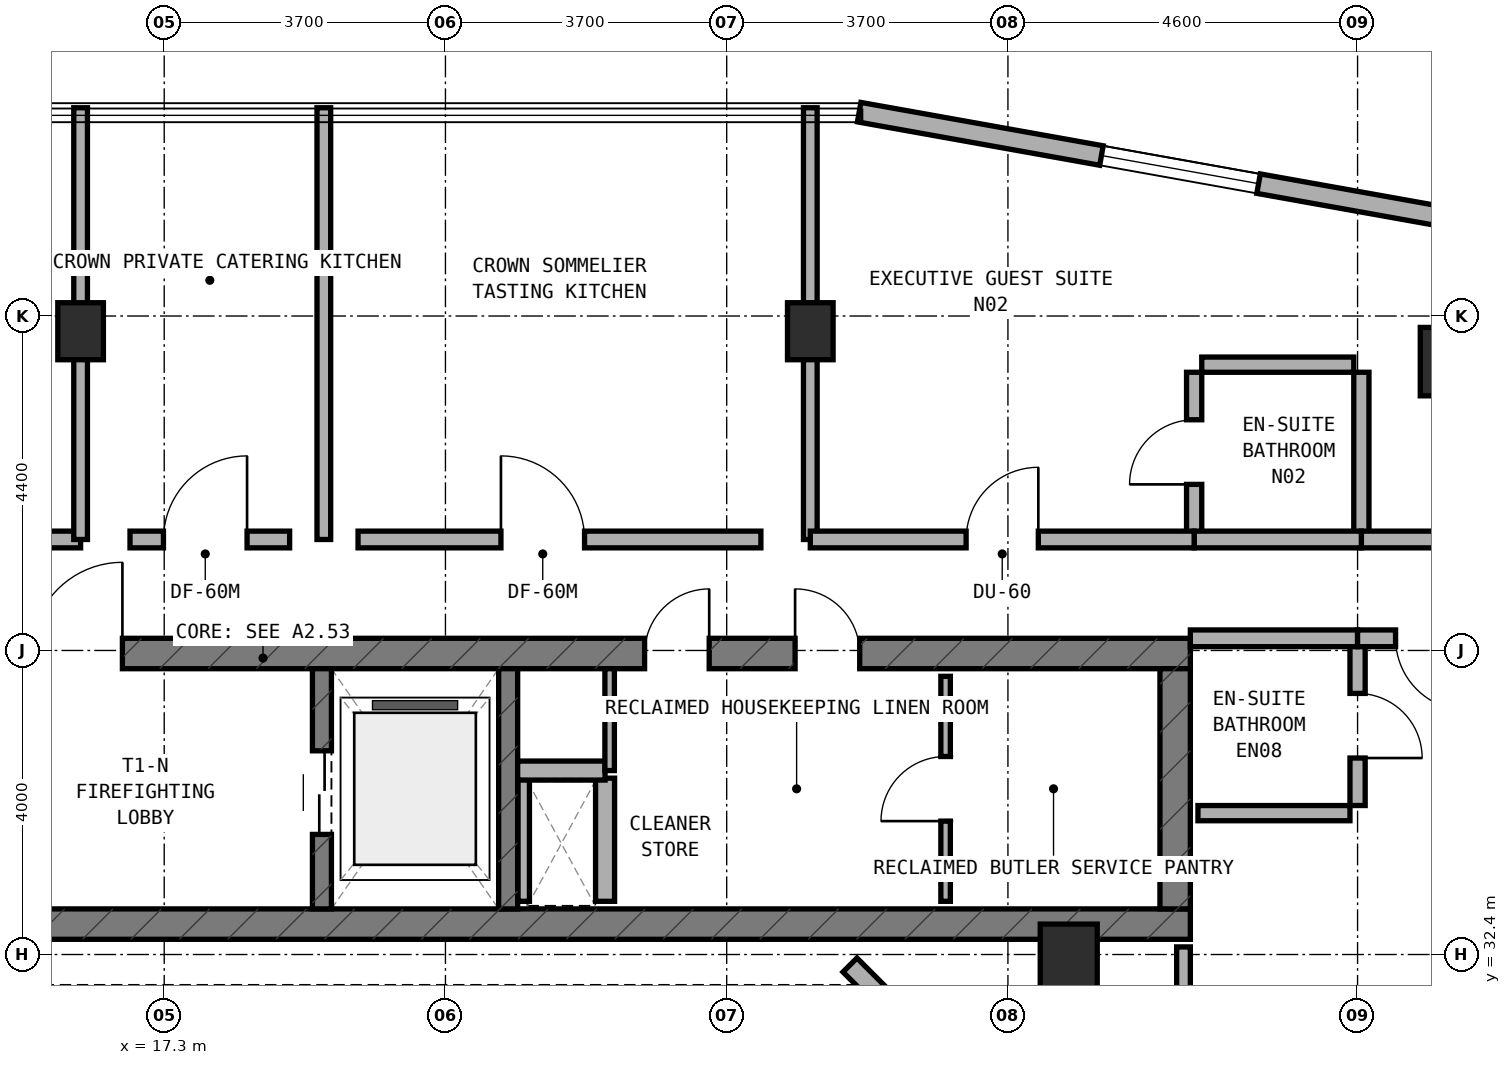
"""IFC4 building model, lengths in metres.
Left out: names, types, materials, properties, quantities, classifications, styles, units other than length and angle.
Written with IfcOpenShell. Run it as: python <this file> out.ifc"""

import sys

from ifc_helpers import new_model, si_unit, direction, frame, frame_2d, origin, origin_2d, place, context, subcontext, project, spatial, rectangle, extrude, element, fill, save


model = new_model("IFC4")
c1 = context("Model", 3, precision=1e-05, world=origin(), true_north=direction((0.0, 1.0)))
c2 = subcontext(c1, "Body", "Model", "MODEL_VIEW")
j1 = project(units=[si_unit("LENGTHUNIT", "METRE"), si_unit("PLANEANGLEUNIT", "RADIAN")], contexts=[c1])
p1 = place(None, origin())
s1 = spatial("IfcSite", under=j1, at=p1, CompositionType="ELEMENT")
p2 = place(p1, origin())
s2 = spatial("IfcBuilding", under=s1, at=p2, CompositionType="ELEMENT")
p3 = place(p2, frame((0.0, 0.0, 246.8)))
s3 = spatial("IfcBuildingStorey", under=s2, at=p3, CompositionType="ELEMENT", Elevation=246.8)
p4 = place(p3, frame((6.4, 32.8, 0.0), z_axis=(0.0, 0.0, 1.0), x_axis=(1.0, 0.0, 0.0)))
e1 = element("IfcWall", 1, at=p4, inside=s3, PredefinedType="SHEAR", context=c2, shape_type="SweptSolid", body=[
    extrude(rectangle(XDim=24.4, YDim=0.4, at=frame_2d((12.2, 0.0))), origin(), (0.0, 0.0, 1.0), 3.6),
])
p5 = place(p4, frame((6.05, 0.0, 0.0)))
e2 = element("IfcOpeningElement", 2, at=p5, cuts=e1, PredefinedType="OPENING", context=c2, shape_type="SweptSolid", body=[
    extrude(rectangle(XDim=1.1, YDim=2.15, at=frame_2d((0.55, 1.075))), frame((0.0, 0.21, 0.0), z_axis=(0.0, -1.0, 0.0), x_axis=(1.0, 0.0, 0.0)), (0.0, 0.0, 1.0), 0.42),
])
p6 = place(p3, frame((6.4, 36.36, 0.0), z_axis=(0.0, 0.0, 1.0), x_axis=(1.0, 0.0, 0.0)))
e3 = element("IfcWall", 3, at=p6, inside=s3, PredefinedType="SHEAR", context=c2, shape_type="SweptSolid", body=[
    extrude(rectangle(XDim=24.4, YDim=0.4, at=frame_2d((12.2, 0.0))), origin(), (0.0, 0.0, 1.0), 3.6),
])
p7 = place(p6, frame((9.15, 0.0, 0.0)))
e4 = element("IfcOpeningElement", 4, at=p7, cuts=e3, PredefinedType="OPENING", context=c2, shape_type="SweptSolid", body=[
    extrude(rectangle(XDim=1.2, YDim=2.15, at=frame_2d((0.6, 1.075))), frame((0.0, 0.21, 0.0), z_axis=(0.0, -1.0, 0.0), x_axis=(1.0, 0.0, 0.0)), (0.0, 0.0, 1.0), 0.42),
])
p8 = place(p6, frame((19.2, 0.0, 0.0)))
e5 = element("IfcOpeningElement", 5, at=p8, cuts=e3, PredefinedType="OPENING", context=c2, shape_type="SweptSolid", body=[
    extrude(rectangle(XDim=0.85, YDim=2.1, at=frame_2d((0.425, 1.05))), frame((0.0, 0.21, 0.0), z_axis=(0.0, -1.0, 0.0), x_axis=(1.0, 0.0, 0.0)), (0.0, 0.0, 1.0), 0.42),
])
p9 = place(p6, frame((17.22, 0.0, 0.0)))
e6 = element("IfcOpeningElement", 6, at=p9, cuts=e3, PredefinedType="OPENING", context=c2, shape_type="SweptSolid", body=[
    extrude(rectangle(XDim=0.85, YDim=2.1, at=frame_2d((0.425, 1.05))), frame((0.0, 0.21, 0.0), z_axis=(0.0, -1.0, 0.0), x_axis=(1.0, 0.0, 0.0)), (0.0, 0.0, 1.0), 0.42),
])
p10 = place(p3, frame((30.6, 33.0, 0.0), z_axis=(0.0, 0.0, 1.0), x_axis=(0.0, 1.0, 0.0)))
e7 = element("IfcWall", 7, at=p10, inside=s3, PredefinedType="SHEAR", context=c2, shape_type="SweptSolid", body=[
    extrude(rectangle(XDim=3.16, YDim=0.4, at=frame_2d((1.58, 0.0))), origin(), (0.0, 0.0, 1.0), 3.6),
])
p11 = place(p3, frame((19.375, 33.0, 0.0), z_axis=(0.0, 0.0, 1.0), x_axis=(0.0, 1.0, 0.0)))
e8 = element("IfcWall", 8, at=p11, inside=s3, PredefinedType="STANDARD", context=c2, shape_type="SweptSolid", body=[
    extrude(rectangle(XDim=3.16, YDim=0.25, at=frame_2d((1.58, 0.0))), origin(), (0.0, 0.0, 1.0), 3.32),
])
p12 = place(p11, frame((0.98, 0.0, 0.0)))
e9 = element("IfcOpeningElement", 9, at=p12, cuts=e8, PredefinedType="OPENING", context=c2, shape_type="SweptSolid", body=[
    extrude(rectangle(XDim=1.1, YDim=2.15, at=frame_2d((0.55, 1.075))), frame((0.0, 0.135, 0.0), z_axis=(0.0, -1.0, 0.0), x_axis=(1.0, 0.0, 0.0)), (0.0, 0.0, 1.0), 0.27),
])
p13 = place(p3, frame((21.825, 33.0, 0.0), z_axis=(0.0, 0.0, 1.0), x_axis=(0.0, 1.0, 0.0)))
e10 = element("IfcWall", 10, at=p13, inside=s3, PredefinedType="STANDARD", context=c2, shape_type="SweptSolid", body=[
    extrude(rectangle(XDim=3.16, YDim=0.25, at=frame_2d((1.58, 0.0))), origin(), (0.0, 0.0, 1.0), 3.32),
])
for number, where, z_axis, x_axis in (
    (11, (16.2, 40.6, 0.0), (0.0, 0.0, 1.0), (1.0, 0.0, 0.0)),
    (12, (25.8, 40.6, 0.0), (0.0, 0.0, 1.0), (1.0, 0.0, 0.0)),
):
    element("IfcColumn", number, at=place(p3, frame(where, z_axis=z_axis, x_axis=x_axis)), inside=s3, PredefinedType="COLUMN", context=c2, shape_type="SweptSolid", body=[
        extrude(rectangle(XDim=0.6, YDim=0.75, at=origin_2d()), origin(), (0.0, 0.0, 1.0), 3.6),
    ])
for number, where, z_axis, x_axis in (
    (13, (34.2, 40.2, 0.0), (0.0, 0.0, 1.0), (1.0, 0.0, 0.0)),
    (14, (29.2, 32.35, 0.0), (0.0, 0.0, 1.0), (1.0, 0.0, 0.0)),
):
    element("IfcColumn", number, at=place(p3, frame(where, z_axis=z_axis, x_axis=x_axis)), inside=s3, PredefinedType="COLUMN", context=c2, shape_type="SweptSolid", body=[
        extrude(rectangle(XDim=0.75, YDim=0.9, at=origin_2d()), origin(), (0.0, 0.0, 1.0), 3.6),
    ])
p14 = place(p3, frame((34.885, 41.971, 0.0), z_axis=(0.0, 0.0, 1.0), x_axis=(-0.98435676639, 0.176186709098, 0.0)))
e15 = element("IfcWall", 15, at=p14, inside=s3, PredefinedType="STANDARD", context=c2, shape_type="SweptSolid", body=[
    extrude(rectangle(XDim=8.576, YDim=0.26, at=frame_2d((4.288, 0.0))), origin(), (0.0, 0.0, 1.0), 3.32),
])
p15 = place(p14, frame((3.238, 0.0, 0.85)))
e16 = element("IfcOpeningElement", 16, at=p15, cuts=e15, PredefinedType="OPENING", context=c2, shape_type="SweptSolid", body=[
    extrude(rectangle(XDim=2.1, YDim=1.5, at=frame_2d((1.05, 0.75))), frame((0.0, 0.14, 0.0), z_axis=(0.0, -1.0, 0.0), x_axis=(1.0, 0.0, 0.0)), (0.0, 0.0, 1.0), 0.28),
])
p16 = place(p3, frame((28.156, 30.428, 0.0), z_axis=(0.0, 0.0, 1.0), x_axis=(-0.707106781187, 0.707106781187, 0.0)))
e17 = element("IfcWall", 17, at=p16, inside=s3, PredefinedType="STANDARD", context=c2, shape_type="SweptSolid", body=[
    extrude(rectangle(XDim=2.594, YDim=0.26, at=frame_2d((1.297, 0.0))), origin(), (0.0, 0.0, 1.0), 3.32),
])
p17 = place(p3, frame((27.58, 33.1, 0.0), z_axis=(0.0, 0.0, 1.0), x_axis=(0.0, 1.0, 0.0)))
e18 = element("IfcWall", 18, at=p17, inside=s3, PredefinedType="PARTITIONING", context=c2, shape_type="SweptSolid", body=[
    extrude(rectangle(XDim=2.96, YDim=0.125, at=frame_2d((1.48, 0.0))), origin(), (0.0, 0.0, 1.0), 3.32),
])
p18 = place(p17, frame((1.055, 0.0, 0.0)))
e19 = element("IfcOpeningElement", 19, at=p18, cuts=e18, PredefinedType="OPENING", context=c2, shape_type="SweptSolid", body=[
    extrude(rectangle(XDim=0.85, YDim=2.1, at=frame_2d((0.425, 1.05))), frame((0.0, 0.073, 0.0), z_axis=(0.0, -1.0, 0.0), x_axis=(1.0, 0.0, 0.0)), (0.0, 0.0, 1.0), 0.145),
])
p19 = place(p3, frame((22.03, 33.1, 0.0), z_axis=(0.0, 0.0, 1.0), x_axis=(0.0, 1.0, 0.0)))
e20 = element("IfcWall", 20, at=p19, inside=s3, PredefinedType="PARTITIONING", context=c2, shape_type="SweptSolid", body=[
    extrude(rectangle(XDim=1.62, YDim=0.15, at=frame_2d((0.81, 0.0))), origin(), (0.0, 0.0, 1.0), 3.32),
])
p20 = place(p3, frame((23.1, 33.1, 0.0), z_axis=(0.0, 0.0, 1.0), x_axis=(0.0, 1.0, 0.0)))
e21 = element("IfcWall", 21, at=p20, inside=s3, PredefinedType="SOLIDWALL", context=c2, shape_type="SweptSolid", body=[
    extrude(rectangle(XDim=1.62, YDim=0.25, at=frame_2d((0.81, 0.0))), origin(), (0.0, 0.0, 1.0), 3.32),
])
p21 = place(p3, frame((21.95, 34.82, 0.0), z_axis=(0.0, 0.0, 1.0), x_axis=(1.0, 0.0, 0.0)))
e22 = element("IfcWall", 22, at=p21, inside=s3, PredefinedType="SOLIDWALL", context=c2, shape_type="SweptSolid", body=[
    extrude(rectangle(XDim=1.15, YDim=0.25, at=frame_2d((0.575, 0.0))), origin(), (0.0, 0.0, 1.0), 3.32),
])
p22 = place(p3, frame((23.16, 34.82, 0.0), z_axis=(0.0, 0.0, 1.0), x_axis=(0.0, 1.0, 0.0)))
e23 = element("IfcWall", 23, at=p22, inside=s3, PredefinedType="PARTITIONING", context=c2, shape_type="SweptSolid", body=[
    extrude(rectangle(XDim=1.34, YDim=0.125, at=frame_2d((0.67, 0.0))), origin(), (0.0, 0.0, 1.0), 3.32),
])
p23 = place(p3, frame((11.15, 37.86, 0.0), z_axis=(0.0, 0.0, 1.0), x_axis=(1.0, 0.0, 0.0)))
e24 = element("IfcWall", 24, at=p23, inside=s3, PredefinedType="SOLIDWALL", context=c2, shape_type="SweptSolid", body=[
    extrude(rectangle(XDim=5.05, YDim=0.22, at=frame_2d((2.525, 0.0))), origin(), (0.0, 0.0, 1.0), 2.745),
])
p24 = place(p23, frame((2.05, 0.0, 0.0)))
e25 = element("IfcOpeningElement", 25, at=p24, cuts=e24, PredefinedType="OPENING", context=c2, shape_type="SweptSolid", body=[
    extrude(rectangle(XDim=0.95, YDim=2.1, at=frame_2d((0.475, 1.05))), frame((0.0, 0.12, 0.0), z_axis=(0.0, -1.0, 0.0), x_axis=(1.0, 0.0, 0.0)), (0.0, 0.0, 1.0), 0.24),
])
p25 = place(p3, frame((16.2, 37.86, 0.0), z_axis=(0.0, 0.0, 1.0), x_axis=(0.0, 1.0, 0.0)))
e26 = element("IfcWall", 26, at=p25, inside=s3, PredefinedType="SOLIDWALL", context=c2, shape_type="SweptSolid", body=[
    extrude(rectangle(XDim=5.68, YDim=0.18, at=frame_2d((2.84, 0.0))), origin(), (0.0, 0.0, 1.0), 2.745),
])
p26 = place(p3, frame((19.4, 37.86, 0.0), z_axis=(0.0, 0.0, 1.0), x_axis=(0.0, 1.0, 0.0)))
e27 = element("IfcWall", 27, at=p26, inside=s3, PredefinedType="SOLIDWALL", context=c2, shape_type="SweptSolid", body=[
    extrude(rectangle(XDim=5.68, YDim=0.18, at=frame_2d((2.84, 0.0))), origin(), (0.0, 0.0, 1.0), 3.015),
])
p27 = place(p3, frame((16.85, 37.86, 0.0), z_axis=(0.0, 0.0, 1.0), x_axis=(1.0, 0.0, 0.0)))
e28 = element("IfcWall", 28, at=p27, inside=s3, PredefinedType="SOLIDWALL", context=c2, shape_type="SweptSolid", body=[
    extrude(rectangle(XDim=2.1, YDim=0.22, at=frame_2d((1.05, 0.0))), origin(), (0.0, 0.0, 1.0), 3.32),
])
p28 = place(p27, frame((0.44, 0.0, 0.0)))
e29 = element("IfcOpeningElement", 29, at=p28, cuts=e28, PredefinedType="OPENING", context=c2, shape_type="SweptSolid", body=[
    extrude(rectangle(XDim=1.1, YDim=2.1, at=frame_2d((0.55, 1.05))), frame((0.0, 0.12, 0.0), z_axis=(0.0, -1.0, 0.0), x_axis=(1.0, 0.0, 0.0)), (0.0, 0.0, 1.0), 0.24),
])
p29 = place(p3, frame((19.85, 37.86, 0.0), z_axis=(0.0, 0.0, 1.0), x_axis=(1.0, 0.0, 0.0)))
e30 = element("IfcWall", 30, at=p29, inside=s3, PredefinedType="SOLIDWALL", context=c2, shape_type="SweptSolid", body=[
    extrude(rectangle(XDim=5.3, YDim=0.22, at=frame_2d((2.65, 0.0))), origin(), (0.0, 0.0, 1.0), 3.32),
])
p30 = place(p29, frame((1.88, 0.0, 0.0)))
e31 = element("IfcOpeningElement", 31, at=p30, cuts=e30, PredefinedType="OPENING", context=c2, shape_type="SweptSolid", body=[
    extrude(rectangle(XDim=1.1, YDim=2.1, at=frame_2d((0.55, 1.05))), frame((0.0, 0.12, 0.0), z_axis=(0.0, -1.0, 0.0), x_axis=(1.0, 0.0, 0.0)), (0.0, 0.0, 1.0), 0.24),
])
p31 = place(p3, frame((25.8, 37.86, 0.0), z_axis=(0.0, 0.0, 1.0), x_axis=(0.0, 1.0, 0.0)))
e32 = element("IfcWall", 32, at=p31, inside=s3, PredefinedType="SOLIDWALL", context=c2, shape_type="SweptSolid", body=[
    extrude(rectangle(XDim=5.68, YDim=0.18, at=frame_2d((2.84, 0.0))), origin(), (0.0, 0.0, 1.0), 2.745),
])
p32 = place(p3, frame((30.85, 37.96, 0.0), z_axis=(0.0, 0.0, 1.0), x_axis=(0.0, 1.0, 0.0)))
e33 = element("IfcWall", 33, at=p32, inside=s3, PredefinedType="PLUMBINGWALL", context=c2, shape_type="SweptSolid", body=[
    extrude(rectangle(XDim=2.1, YDim=0.2, at=frame_2d((1.05, 0.0))), origin(), (0.0, 0.0, 1.0), 3.025),
])
p33 = place(p32, frame((0.625, 0.0, 0.0)))
e34 = element("IfcOpeningElement", 34, at=p33, cuts=e33, PredefinedType="OPENING", context=c2, shape_type="SweptSolid", body=[
    extrude(rectangle(XDim=0.85, YDim=2.1, at=frame_2d((0.425, 1.05))), frame((0.0, 0.11, 0.0), z_axis=(0.0, -1.0, 0.0), x_axis=(1.0, 0.0, 0.0)), (0.0, 0.0, 1.0), 0.22),
])
p34 = place(p3, frame((30.95, 40.16, 0.0), z_axis=(0.0, 0.0, 1.0), x_axis=(1.0, 0.0, 0.0)))
e35 = element("IfcWall", 35, at=p34, inside=s3, PredefinedType="PLUMBINGWALL", context=c2, shape_type="SweptSolid", body=[
    extrude(rectangle(XDim=2.0, YDim=0.2, at=frame_2d((1.0, 0.0))), origin(), (0.0, 0.0, 1.0), 3.015),
])
p35 = place(p3, frame((33.05, 37.96, 0.0), z_axis=(0.0, 0.0, 1.0), x_axis=(0.0, 1.0, 0.0)))
e36 = element("IfcWall", 36, at=p35, inside=s3, PredefinedType="PLUMBINGWALL", context=c2, shape_type="SweptSolid", body=[
    extrude(rectangle(XDim=2.1, YDim=0.2, at=frame_2d((1.05, 0.0))), origin(), (0.0, 0.0, 1.0), 3.025),
])
p36 = place(p3, frame((33.05, 37.86, 0.0), z_axis=(0.0, 0.0, 1.0), x_axis=(1.0, 0.0, 0.0)))
e37 = element("IfcWall", 37, at=p36, inside=s3, PredefinedType="SOLIDWALL", context=c2, shape_type="SweptSolid", body=[
    extrude(rectangle(XDim=6.19, YDim=0.22, at=frame_2d((3.095, 0.0))), origin(), (0.0, 0.0, 1.0), 2.745),
])
p37 = place(p3, frame((30.85, 37.86, 0.0), z_axis=(0.0, 0.0, 1.0), x_axis=(1.0, 0.0, 0.0)))
e38 = element("IfcWall", 38, at=p37, inside=s3, PredefinedType="SOLIDWALL", context=c2, shape_type="SweptSolid", body=[
    extrude(rectangle(XDim=2.2, YDim=0.22, at=frame_2d((1.1, 0.0))), origin(), (0.0, 0.0, 1.0), 3.32),
])
p38 = place(p3, frame((25.8, 37.86, 0.0), z_axis=(0.0, 0.0, 1.0), x_axis=(1.0, 0.0, 0.0)))
e39 = element("IfcWall", 39, at=p38, inside=s3, PredefinedType="SOLIDWALL", context=c2, shape_type="SweptSolid", body=[
    extrude(rectangle(XDim=5.05, YDim=0.22, at=frame_2d((2.525, 0.0))), origin(), (0.0, 0.0, 1.0), 2.745),
])
p39 = place(p38, frame((2.05, 0.0, 0.0)))
e40 = element("IfcOpeningElement", 40, at=p39, cuts=e39, PredefinedType="OPENING", context=c2, shape_type="SweptSolid", body=[
    extrude(rectangle(XDim=0.95, YDim=2.1, at=frame_2d((0.475, 1.05))), frame((0.0, 0.12, 0.0), z_axis=(0.0, -1.0, 0.0), x_axis=(1.0, 0.0, 0.0)), (0.0, 0.0, 1.0), 0.24),
])
p40 = place(p3, frame((30.71, 17.5, 0.0), z_axis=(0.0, 0.0, 1.0), x_axis=(0.0, 1.0, 0.0)))
e41 = element("IfcWall", 41, at=p40, inside=s3, PredefinedType="SOLIDWALL", context=c2, shape_type="SweptSolid", body=[
    extrude(rectangle(XDim=15.0, YDim=0.18, at=frame_2d((7.5, 0.0))), origin(), (0.0, 0.0, 1.0), 2.745),
])
p41 = place(p3, frame((33.0, 34.36, 0.0), z_axis=(0.0, 0.0, 1.0), x_axis=(0.0, 1.0, 0.0)))
e42 = element("IfcWall", 42, at=p41, inside=s3, PredefinedType="PLUMBINGWALL", context=c2, shape_type="SweptSolid", body=[
    extrude(rectangle(XDim=2.1, YDim=0.2, at=frame_2d((1.05, 0.0))), origin(), (0.0, 0.0, 1.0), 3.32),
])
p42 = place(p41, frame((0.625, 0.0, 0.0)))
e43 = element("IfcOpeningElement", 43, at=p42, cuts=e42, PredefinedType="OPENING", context=c2, shape_type="SweptSolid", body=[
    extrude(rectangle(XDim=0.85, YDim=2.1, at=frame_2d((0.425, 1.05))), frame((0.0, 0.11, 0.0), z_axis=(0.0, -1.0, 0.0), x_axis=(1.0, 0.0, 0.0)), (0.0, 0.0, 1.0), 0.22),
])
p43 = place(p3, frame((30.9, 34.26, 0.0), z_axis=(0.0, 0.0, 1.0), x_axis=(1.0, 0.0, 0.0)))
e44 = element("IfcWall", 44, at=p43, inside=s3, PredefinedType="PLUMBINGWALL", context=c2, shape_type="SweptSolid", body=[
    extrude(rectangle(XDim=2.0, YDim=0.2, at=frame_2d((1.0, 0.0))), origin(), (0.0, 0.0, 1.0), 3.32),
])
p44 = place(p3, frame((30.8, 36.56, 0.0), z_axis=(0.0, 0.0, 1.0), x_axis=(1.0, 0.0, 0.0)))
e45 = element("IfcWall", 45, at=p44, inside=s3, PredefinedType="SOLIDWALL", context=c2, shape_type="SweptSolid", body=[
    extrude(rectangle(XDim=2.2, YDim=0.22, at=frame_2d((1.1, 0.0))), origin(), (0.0, 0.0, 1.0), 3.32),
])
p45 = place(p3, frame((33.0, 36.56, 0.0), z_axis=(0.0, 0.0, 1.0), x_axis=(1.0, 0.0, 0.0)))
e46 = element("IfcWall", 46, at=p45, inside=s3, PredefinedType="SOLIDWALL", context=c2, shape_type="SweptSolid", body=[
    extrude(rectangle(XDim=6.4, YDim=0.22, at=frame_2d((3.2, 0.0))), origin(), (0.0, 0.0, 1.0), 2.745),
])
p46 = place(p45, frame((0.5, 0.0, 0.0)))
e47 = element("IfcOpeningElement", 47, at=p46, cuts=e46, PredefinedType="OPENING", context=c2, shape_type="SweptSolid", body=[
    extrude(rectangle(XDim=0.95, YDim=2.1, at=frame_2d((0.475, 1.05))), frame((0.0, 0.12, 0.0), z_axis=(0.0, -1.0, 0.0), x_axis=(1.0, 0.0, 0.0)), (0.0, 0.0, 1.0), 0.24),
])
p47 = place(p15, origin())
e48 = element("IfcWindow", 48, at=p47, inside=s3, PartitioningType="SINGLE_PANEL", PredefinedType="WINDOW", context=c2, shape_type="SweptSolid", body=[
    extrude(rectangle(XDim=2.1, YDim=1.5, at=frame_2d((1.05, 0.75))), frame((0.0, 0.03, 0.0), z_axis=(0.0, -1.0, 0.0), x_axis=(1.0, 0.0, 0.0)), (0.0, 0.0, 1.0), 0.06),
])
fill(e16, e48)
p48 = place(p7, origin())
e49 = element("IfcDoor", 49, at=p48, inside=s3, OperationType="SINGLE_SWING_RIGHT", PredefinedType="DOOR", context=c2, shape_type="SweptSolid", body=[
    extrude(rectangle(XDim=1.2, YDim=2.15, at=frame_2d((0.6, 1.075))), frame((0.0, 0.025, 0.0), z_axis=(0.0, -1.0, 0.0), x_axis=(1.0, 0.0, 0.0)), (0.0, 0.0, 1.0), 0.05),
])
fill(e4, e49)
p49 = place(p12, origin())
e50 = element("IfcDoor", 50, at=p49, inside=s3, OperationType="DOUBLE_DOOR_SLIDING", PredefinedType="DOOR", context=c2, shape_type="SweptSolid", body=[
    extrude(rectangle(XDim=1.1, YDim=2.15, at=frame_2d((0.55, 1.075))), frame((0.0, 0.025, 0.0), z_axis=(0.0, -1.0, 0.0), x_axis=(1.0, 0.0, 0.0)), (0.0, 0.0, 1.0), 0.05),
])
fill(e9, e50)
p50 = place(p8, origin())
e51 = element("IfcDoor", 51, at=p50, inside=s3, OperationType="SINGLE_SWING_LEFT", PredefinedType="DOOR", context=c2, shape_type="SweptSolid", body=[
    extrude(rectangle(XDim=0.85, YDim=2.1, at=frame_2d((0.425, 1.05))), frame((0.0, 0.025, 0.0), z_axis=(0.0, -1.0, 0.0), x_axis=(1.0, 0.0, 0.0)), (0.0, 0.0, 1.0), 0.05),
])
fill(e5, e51)
p51 = place(p9, origin())
e52 = element("IfcDoor", 52, at=p51, inside=s3, OperationType="SINGLE_SWING_RIGHT", PredefinedType="DOOR", context=c2, shape_type="SweptSolid", body=[
    extrude(rectangle(XDim=0.85, YDim=2.1, at=frame_2d((0.425, 1.05))), frame((0.0, 0.025, 0.0), z_axis=(0.0, -1.0, 0.0), x_axis=(1.0, 0.0, 0.0)), (0.0, 0.0, 1.0), 0.05),
])
fill(e6, e52)
p52 = place(p18, origin())
e53 = element("IfcDoor", 53, at=p52, inside=s3, OperationType="SINGLE_SWING_LEFT", PredefinedType="DOOR", context=c2, shape_type="SweptSolid", body=[
    extrude(rectangle(XDim=0.85, YDim=2.1, at=frame_2d((0.425, 1.05))), frame((0.0, 0.025, 0.0), z_axis=(0.0, -1.0, 0.0), x_axis=(1.0, 0.0, 0.0)), (0.0, 0.0, 1.0), 0.05),
])
fill(e19, e53)
p53 = place(p28, origin())
e54 = element("IfcDoor", 54, at=p53, inside=s3, OperationType="SINGLE_SWING_RIGHT", PredefinedType="DOOR", context=c2, shape_type="SweptSolid", body=[
    extrude(rectangle(XDim=1.1, YDim=2.1, at=frame_2d((0.55, 1.05))), frame((0.0, 0.025, 0.0), z_axis=(0.0, -1.0, 0.0), x_axis=(1.0, 0.0, 0.0)), (0.0, 0.0, 1.0), 0.05),
])
fill(e29, e54)
p54 = place(p30, origin())
e55 = element("IfcDoor", 55, at=p54, inside=s3, OperationType="SINGLE_SWING_LEFT", PredefinedType="DOOR", context=c2, shape_type="SweptSolid", body=[
    extrude(rectangle(XDim=1.1, YDim=2.1, at=frame_2d((0.55, 1.05))), frame((0.0, 0.025, 0.0), z_axis=(0.0, -1.0, 0.0), x_axis=(1.0, 0.0, 0.0)), (0.0, 0.0, 1.0), 0.05),
])
fill(e31, e55)
p55 = place(p33, origin())
e56 = element("IfcDoor", 56, at=p55, inside=s3, OperationType="SINGLE_SWING_LEFT", PredefinedType="DOOR", context=c2, shape_type="SweptSolid", body=[
    extrude(rectangle(XDim=0.85, YDim=2.1, at=frame_2d((0.425, 1.05))), frame((0.0, 0.025, 0.0), z_axis=(0.0, -1.0, 0.0), x_axis=(1.0, 0.0, 0.0)), (0.0, 0.0, 1.0), 0.05),
])
fill(e34, e56)
p56 = place(p39, origin())
e57 = element("IfcDoor", 57, at=p56, inside=s3, OperationType="SINGLE_SWING_RIGHT", PredefinedType="DOOR", context=c2, shape_type="SweptSolid", body=[
    extrude(rectangle(XDim=0.95, YDim=2.1, at=frame_2d((0.475, 1.05))), frame((0.0, 0.025, 0.0), z_axis=(0.0, -1.0, 0.0), x_axis=(1.0, 0.0, 0.0)), (0.0, 0.0, 1.0), 0.05),
])
fill(e40, e57)
p57 = place(p42, frame((0.85, 0.0, 0.0), z_axis=(0.0, 0.0, 1.0), x_axis=(-1.0, 0.0, 0.0)))
e58 = element("IfcDoor", 58, at=p57, inside=s3, OperationType="SINGLE_SWING_RIGHT", PredefinedType="DOOR", context=c2, shape_type="SweptSolid", body=[
    extrude(rectangle(XDim=0.85, YDim=2.1, at=frame_2d((0.425, 1.05))), frame((0.0, 0.025, 0.0), z_axis=(0.0, -1.0, 0.0), x_axis=(1.0, 0.0, 0.0)), (0.0, 0.0, 1.0), 0.05),
])
fill(e43, e58)
p58 = place(p46, frame((0.95, 0.0, 0.0), z_axis=(0.0, 0.0, 1.0), x_axis=(-1.0, 0.0, 0.0)))
e59 = element("IfcDoor", 59, at=p58, inside=s3, OperationType="SINGLE_SWING_LEFT", PredefinedType="DOOR", context=c2, shape_type="SweptSolid", body=[
    extrude(rectangle(XDim=0.95, YDim=2.1, at=frame_2d((0.475, 1.05))), frame((0.0, 0.025, 0.0), z_axis=(0.0, -1.0, 0.0), x_axis=(1.0, 0.0, 0.0)), (0.0, 0.0, 1.0), 0.05),
])
fill(e47, e59)
save(model, sys.argv[1])
